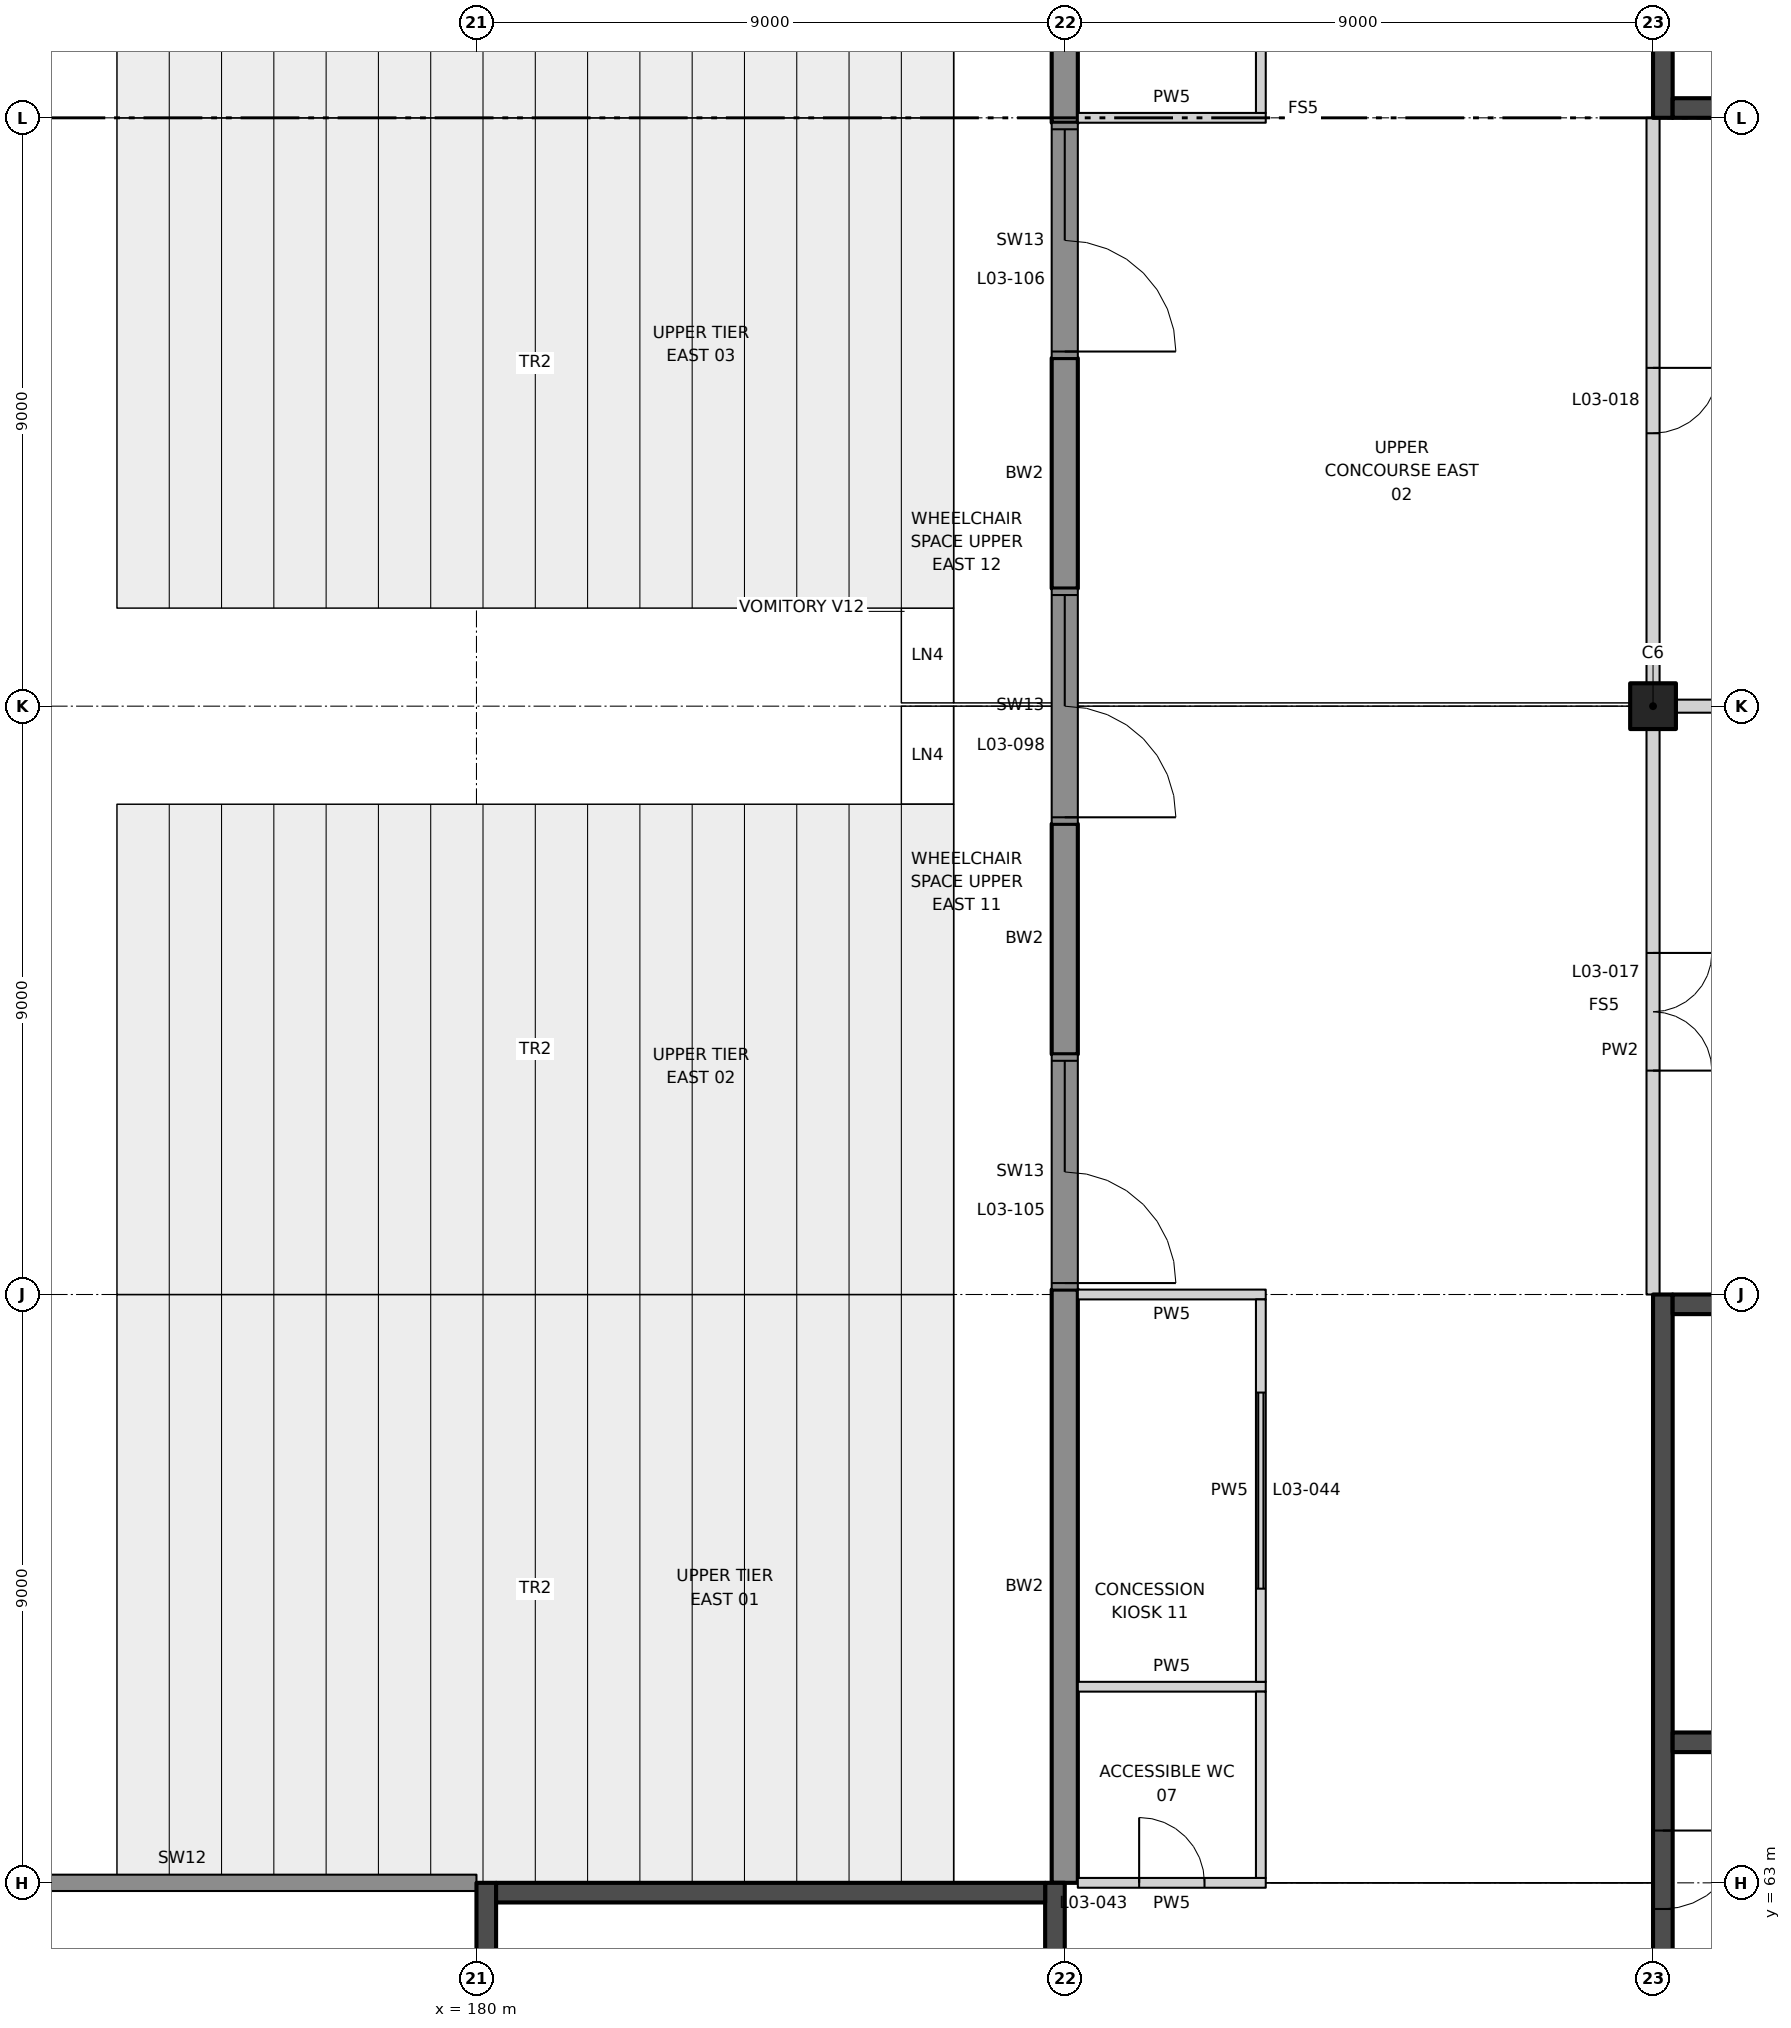
"""IFC4 building model, lengths in metres.
Left out: names, types, materials, properties, quantities, classifications, styles, units other than length and angle.
Written with IfcOpenShell. Run it as: python <this file> out.ifc"""

import sys

from ifc_helpers import new_model, si_unit, direction, frame, frame_2d, origin, origin_2d, place, context, subcontext, project, spatial, rectangle, extrude, element, fill, save


model = new_model("IFC4")
c1 = context("Model", 3, precision=1e-05, world=origin(), true_north=direction((0.0, 1.0)))
c2 = subcontext(c1, "Body", "Model", "MODEL_VIEW")
j1 = project(units=[si_unit("LENGTHUNIT", "METRE"), si_unit("PLANEANGLEUNIT", "RADIAN")], contexts=[c1])
p1 = place(None, origin())
s1 = spatial("IfcSite", under=j1, at=p1, CompositionType="ELEMENT")
p2 = place(p1, origin())
s2 = spatial("IfcBuilding", under=s1, at=p2, CompositionType="ELEMENT")
p3 = place(p2, frame((0.0, 0.0, 22.0)))
s3 = spatial("IfcBuildingStorey", under=s2, at=p3, CompositionType="ELEMENT", Elevation=22.0)
p4 = place(p3, frame((198.0, 81.0, 0.0), z_axis=(0.0, 0.0, 1.0), x_axis=(1.0, 0.0, 0.0)))
e1 = element("IfcColumn", 1, at=p4, inside=s3, PredefinedType="COLUMN", context=c2, shape_type="SweptSolid", body=[
    extrude(rectangle(XDim=0.7, YDim=0.7, at=origin_2d()), origin(), (0.0, 0.0, 1.0), 6.0),
])
p5 = place(p3, frame((189.0, 63.0, 0.0), z_axis=(0.0, 0.0, 1.0), x_axis=(0.0, 1.0, 0.0)))
e2 = element("IfcWall", 2, at=p5, inside=s3, PredefinedType="SOLIDWALL", context=c2, shape_type="SweptSolid", body=[
    extrude(rectangle(XDim=9.075, YDim=0.4, at=frame_2d((4.538, 0.0))), origin(), (0.0, 0.0, 1.0), 6.0),
])
for number, where, z_axis, x_axis in (
    (3, (189.0, 75.675, 0.0), (0.0, 0.0, 1.0), (0.0, 1.0, 0.0)),
    (4, (189.0, 82.8, 0.0), (0.0, 0.0, 1.0), (0.0, 1.0, 0.0)),
):
    element("IfcWall", number, at=place(p3, frame(where, z_axis=z_axis, x_axis=x_axis)), inside=s3, PredefinedType="SOLIDWALL", context=c2, shape_type="SweptSolid", body=[
        extrude(rectangle(XDim=3.525, YDim=0.4, at=frame_2d((1.762, 0.0))), origin(), (0.0, 0.0, 1.0), 6.0),
    ])
p6 = place(p3, frame((189.0, 89.925, 0.0), z_axis=(0.0, 0.0, 1.0), x_axis=(0.0, 1.0, 0.0)))
e5 = element("IfcWall", 5, at=p6, inside=s3, PredefinedType="SOLIDWALL", context=c2, shape_type="SweptSolid", body=[
    extrude(rectangle(XDim=9.075, YDim=0.4, at=frame_2d((4.538, 0.0))), origin(), (0.0, 0.0, 1.0), 6.0),
])
p7 = place(p3, frame((189.2, 63.0, 0.0), z_axis=(0.0, 0.0, 1.0), x_axis=(1.0, 0.0, 0.0)))
e6 = element("IfcWall", 6, at=p7, inside=s3, PredefinedType="PARTITIONING", context=c2, shape_type="SweptSolid", body=[
    extrude(rectangle(XDim=2.875, YDim=0.15, at=frame_2d((1.438, 0.0))), origin(), (0.0, 0.0, 1.0), 4.7),
])
p8 = place(p7, frame((0.938, 0.0, 0.0)))
e7 = element("IfcOpeningElement", 7, at=p8, cuts=e6, PredefinedType="OPENING", context=c2, shape_type="SweptSolid", body=[
    extrude(rectangle(XDim=1.0, YDim=2.1, at=frame_2d((0.5, 1.05))), frame((0.0, 0.085, 0.0), z_axis=(0.0, -1.0, 0.0), x_axis=(1.0, 0.0, 0.0)), (0.0, 0.0, 1.0), 0.17),
])
p9 = place(p3, frame((189.2, 66.0, 0.0), z_axis=(0.0, 0.0, 1.0), x_axis=(1.0, 0.0, 0.0)))
e8 = element("IfcWall", 8, at=p9, inside=s3, PredefinedType="PARTITIONING", context=c2, shape_type="SweptSolid", body=[
    extrude(rectangle(XDim=2.875, YDim=0.15, at=frame_2d((1.438, 0.0))), origin(), (0.0, 0.0, 1.0), 6.0),
])
p10 = place(p3, frame((189.2, 72.0, 0.0), z_axis=(0.0, 0.0, 1.0), x_axis=(1.0, 0.0, 0.0)))
e9 = element("IfcWall", 9, at=p10, inside=s3, PredefinedType="PARTITIONING", context=c2, shape_type="SweptSolid", body=[
    extrude(rectangle(XDim=2.875, YDim=0.15, at=frame_2d((1.438, 0.0))), origin(), (0.0, 0.0, 1.0), 4.7),
])
p11 = place(p3, frame((198.35, 81.0, 0.0), z_axis=(0.0, 0.0, 1.0), x_axis=(1.0, 0.0, 0.0)))
e10 = element("IfcWall", 10, at=p11, inside=s3, PredefinedType="PARTITIONING", context=c2, shape_type="SweptSolid", body=[
    extrude(rectangle(XDim=8.25, YDim=0.2, at=frame_2d((4.125, 0.0))), origin(), (0.0, 0.0, 1.0), 4.8),
])
p12 = place(p3, frame((189.2, 90.0, 0.0), z_axis=(0.0, 0.0, 1.0), x_axis=(1.0, 0.0, 0.0)))
e11 = element("IfcWall", 11, at=p12, inside=s3, PredefinedType="PARTITIONING", context=c2, shape_type="SweptSolid", body=[
    extrude(rectangle(XDim=2.875, YDim=0.15, at=frame_2d((1.438, 0.0))), origin(), (0.0, 0.0, 1.0), 4.7),
])
p13 = place(p3, frame((192.0, 63.075, 0.0), z_axis=(0.0, 0.0, 1.0), x_axis=(0.0, 1.0, 0.0)))
e12 = element("IfcWall", 12, at=p13, inside=s3, PredefinedType="PARTITIONING", context=c2, shape_type="SweptSolid", body=[
    extrude(rectangle(XDim=2.85, YDim=0.15, at=frame_2d((1.425, 0.0))), origin(), (0.0, 0.0, 1.0), 6.0),
])
p14 = place(p3, frame((192.0, 66.075, 0.0), z_axis=(0.0, 0.0, 1.0), x_axis=(0.0, 1.0, 0.0)))
e13 = element("IfcWall", 13, at=p14, inside=s3, PredefinedType="PARTITIONING", context=c2, shape_type="SweptSolid", body=[
    extrude(rectangle(XDim=5.85, YDim=0.15, at=frame_2d((2.925, 0.0))), origin(), (0.0, 0.0, 1.0), 6.0),
])
p15 = place(p14, frame((1.425, 0.0, 0.0)))
e14 = element("IfcOpeningElement", 14, at=p15, cuts=e13, PredefinedType="OPENING", context=c2, shape_type="SweptSolid", body=[
    extrude(rectangle(XDim=3.0, YDim=2.4, at=frame_2d((1.5, 1.2))), frame((0.0, 0.085, 0.0), z_axis=(0.0, -1.0, 0.0), x_axis=(1.0, 0.0, 0.0)), (0.0, 0.0, 1.0), 0.17),
])
p16 = place(p3, frame((192.0, 90.075, 0.0), z_axis=(0.0, 0.0, 1.0), x_axis=(0.0, 1.0, 0.0)))
e15 = element("IfcWall", 15, at=p16, inside=s3, PredefinedType="PARTITIONING", context=c2, shape_type="SweptSolid", body=[
    extrude(rectangle(XDim=5.85, YDim=0.15, at=frame_2d((2.925, 0.0))), origin(), (0.0, 0.0, 1.0), 6.0),
])
p17 = place(p16, frame((1.425, 0.0, 0.0)))
e16 = element("IfcOpeningElement", 16, at=p17, cuts=e15, PredefinedType="OPENING", context=c2, shape_type="SweptSolid", body=[
    extrude(rectangle(XDim=3.0, YDim=2.4, at=frame_2d((1.5, 1.2))), frame((0.0, 0.085, 0.0), z_axis=(0.0, -1.0, 0.0), x_axis=(1.0, 0.0, 0.0)), (0.0, 0.0, 1.0), 0.17),
])
p18 = place(p3, frame((198.0, 72.0, 0.0), z_axis=(0.0, 0.0, 1.0), x_axis=(0.0, 1.0, 0.0)))
e17 = element("IfcWall", 17, at=p18, inside=s3, PredefinedType="PARTITIONING", context=c2, shape_type="SweptSolid", body=[
    extrude(rectangle(XDim=8.65, YDim=0.2, at=frame_2d((4.325, 0.0))), origin(), (0.0, 0.0, 1.0), 4.7),
])
p19 = place(p18, frame((3.425, 0.0, 0.0)))
e18 = element("IfcOpeningElement", 18, at=p19, cuts=e17, PredefinedType="OPENING", context=c2, shape_type="SweptSolid", body=[
    extrude(rectangle(XDim=1.8, YDim=2.1, at=frame_2d((0.9, 1.05))), frame((0.0, 0.11, 0.0), z_axis=(0.0, -1.0, 0.0), x_axis=(1.0, 0.0, 0.0)), (0.0, 0.0, 1.0), 0.22),
])
p20 = place(p3, frame((198.0, 81.35, 0.0), z_axis=(0.0, 0.0, 1.0), x_axis=(0.0, 1.0, 0.0)))
e19 = element("IfcWall", 19, at=p20, inside=s3, PredefinedType="PARTITIONING", context=c2, shape_type="SweptSolid", body=[
    extrude(rectangle(XDim=8.65, YDim=0.2, at=frame_2d((4.325, 0.0))), origin(), (0.0, 0.0, 1.0), 4.7),
])
p21 = place(p20, frame((3.825, 0.0, 0.0)))
e20 = element("IfcOpeningElement", 20, at=p21, cuts=e19, PredefinedType="OPENING", context=c2, shape_type="SweptSolid", body=[
    extrude(rectangle(XDim=1.0, YDim=2.1, at=frame_2d((0.5, 1.05))), frame((0.0, 0.11, 0.0), z_axis=(0.0, -1.0, 0.0), x_axis=(1.0, 0.0, 0.0)), (0.0, 0.0, 1.0), 0.22),
])
p22 = place(p3, frame((198.15, 54.0, 0.0), z_axis=(0.0, 0.0, 1.0), x_axis=(0.0, 1.0, 0.0)))
e21 = element("IfcWall", 21, at=p22, inside=s3, PredefinedType="SHEAR", context=c2, shape_type="SweptSolid", body=[
    extrude(rectangle(XDim=18.0, YDim=0.3, at=frame_2d((9.0, 0.0))), origin(), (0.0, 0.0, 1.0), 6.0),
])
p23 = place(p22, frame((8.6, 0.0, 0.0)))
e22 = element("IfcOpeningElement", 22, at=p23, cuts=e21, PredefinedType="OPENING", context=c2, shape_type="SweptSolid", body=[
    extrude(rectangle(XDim=1.2, YDim=2.1, at=frame_2d((0.6, 1.05))), frame((0.0, 0.16, 0.0), z_axis=(0.0, -1.0, 0.0), x_axis=(1.0, 0.0, 0.0)), (0.0, 0.0, 1.0), 0.32),
])
for number, where, z_axis, x_axis in (
    (23, (198.3, 71.85, 0.0), (0.0, 0.0, 1.0), (1.0, 0.0, 0.0)),
    (24, (198.3, 65.15, 0.0), (0.0, 0.0, 1.0), (1.0, 0.0, 0.0)),
):
    element("IfcWall", number, at=place(p3, frame(where, z_axis=z_axis, x_axis=x_axis)), inside=s3, PredefinedType="SHEAR", context=c2, shape_type="SweptSolid", body=[
        extrude(rectangle(XDim=8.4, YDim=0.3, at=frame_2d((4.2, 0.0))), origin(), (0.0, 0.0, 1.0), 6.0),
    ])
p24 = place(p3, frame((198.15, 108.0, 0.0), z_axis=(0.0, 0.0, 1.0), x_axis=(0.0, -1.0, 0.0)))
e25 = element("IfcWall", 25, at=p24, inside=s3, PredefinedType="SHEAR", context=c2, shape_type="SweptSolid", body=[
    extrude(rectangle(XDim=18.0, YDim=0.3, at=frame_2d((9.0, 0.0))), origin(), (0.0, 0.0, 1.0), 6.0),
])
p25 = place(p24, frame((8.6, 0.0, 0.0)))
e26 = element("IfcOpeningElement", 26, at=p25, cuts=e25, PredefinedType="OPENING", context=c2, shape_type="SweptSolid", body=[
    extrude(rectangle(XDim=1.2, YDim=2.1, at=frame_2d((0.6, 1.05))), frame((0.0, 0.16, 0.0), z_axis=(0.0, -1.0, 0.0), x_axis=(1.0, 0.0, 0.0)), (0.0, 0.0, 1.0), 0.32),
])
p26 = place(p3, frame((198.3, 90.15, 0.0), z_axis=(0.0, 0.0, 1.0), x_axis=(1.0, 0.0, 0.0)))
e27 = element("IfcWall", 27, at=p26, inside=s3, PredefinedType="SHEAR", context=c2, shape_type="SweptSolid", body=[
    extrude(rectangle(XDim=8.4, YDim=0.3, at=frame_2d((4.2, 0.0))), origin(), (0.0, 0.0, 1.0), 6.0),
])
p27 = place(p3, frame((180.15, 63.0, 0.0), z_axis=(0.0, 0.0, 1.0), x_axis=(0.0, -1.0, 0.0)))
e28 = element("IfcWall", 28, at=p27, inside=s3, PredefinedType="SHEAR", context=c2, shape_type="SweptSolid", body=[
    extrude(rectangle(XDim=18.0, YDim=0.3, at=frame_2d((9.0, 0.0))), origin(), (0.0, 0.0, 1.0), 6.0),
])
p28 = place(p27, frame((8.6, 0.0, 0.0)))
e29 = element("IfcOpeningElement", 29, at=p28, cuts=e28, PredefinedType="OPENING", context=c2, shape_type="SweptSolid", body=[
    extrude(rectangle(XDim=1.2, YDim=2.1, at=frame_2d((0.6, 1.05))), frame((0.0, 0.16, 0.0), z_axis=(0.0, -1.0, 0.0), x_axis=(1.0, 0.0, 0.0)), (0.0, 0.0, 1.0), 0.32),
])
p29 = place(p3, frame((188.85, 63.0, 0.0), z_axis=(0.0, 0.0, 1.0), x_axis=(0.0, -1.0, 0.0)))
e30 = element("IfcWall", 30, at=p29, inside=s3, PredefinedType="SHEAR", context=c2, shape_type="SweptSolid", body=[
    extrude(rectangle(XDim=18.0, YDim=0.3, at=frame_2d((9.0, 0.0))), origin(), (0.0, 0.0, 1.0), 6.0),
])
p30 = place(p3, frame((180.3, 62.85, 0.0), z_axis=(0.0, 0.0, 1.0), x_axis=(1.0, 0.0, 0.0)))
e31 = element("IfcWall", 31, at=p30, inside=s3, PredefinedType="SHEAR", context=c2, shape_type="SweptSolid", body=[
    extrude(rectangle(XDim=8.4, YDim=0.3, at=frame_2d((4.2, 0.0))), origin(), (0.0, 0.0, 1.0), 6.0),
])
p31 = place(p3, frame((171.0, 63.0, 0.0), z_axis=(0.0, 0.0, 1.0), x_axis=(1.0, 0.0, 0.0)))
e32 = element("IfcWall", 32, at=p31, inside=s3, PredefinedType="SOLIDWALL", context=c2, shape_type="SweptSolid", body=[
    extrude(rectangle(XDim=9.0, YDim=0.25, at=frame_2d((4.5, 0.0))), origin(), (0.0, 0.0, 1.0), 4.7),
])
p32 = place(p3, frame((189.0, 79.2, 0.0), z_axis=(0.0, 0.0, 1.0), x_axis=(0.0, 1.0, 0.0)))
e33 = element("IfcWall", 33, at=p32, inside=s3, PredefinedType="SOLIDWALL", context=c2, shape_type="SweptSolid", body=[
    extrude(rectangle(XDim=3.6, YDim=0.4, at=frame_2d((1.8, 0.0))), origin(), (0.0, 0.0, 1.0), 3.0),
])
p33 = place(p32, frame((0.1, 0.0, 0.0)))
e34 = element("IfcOpeningElement", 34, at=p33, cuts=e33, PredefinedType="OPENING", context=c2, shape_type="SweptSolid", body=[
    extrude(rectangle(XDim=3.4, YDim=2.4, at=frame_2d((1.7, 1.2))), frame((0.0, 0.21, 0.0), z_axis=(0.0, -1.0, 0.0), x_axis=(1.0, 0.0, 0.0)), (0.0, 0.0, 1.0), 0.42),
])
p34 = place(p3, frame((189.0, 72.075, 0.0), z_axis=(0.0, 0.0, 1.0), x_axis=(0.0, 1.0, 0.0)))
e35 = element("IfcWall", 35, at=p34, inside=s3, PredefinedType="SOLIDWALL", context=c2, shape_type="SweptSolid", body=[
    extrude(rectangle(XDim=3.6, YDim=0.4, at=frame_2d((1.8, 0.0))), origin(), (0.0, 0.0, 1.0), 3.0),
])
p35 = place(p34, frame((0.1, 0.0, 0.0)))
e36 = element("IfcOpeningElement", 36, at=p35, cuts=e35, PredefinedType="OPENING", context=c2, shape_type="SweptSolid", body=[
    extrude(rectangle(XDim=3.4, YDim=2.4, at=frame_2d((1.7, 1.2))), frame((0.0, 0.21, 0.0), z_axis=(0.0, -1.0, 0.0), x_axis=(1.0, 0.0, 0.0)), (0.0, 0.0, 1.0), 0.42),
])
p36 = place(p3, frame((189.0, 86.325, 0.0), z_axis=(0.0, 0.0, 1.0), x_axis=(0.0, 1.0, 0.0)))
e37 = element("IfcWall", 37, at=p36, inside=s3, PredefinedType="SOLIDWALL", context=c2, shape_type="SweptSolid", body=[
    extrude(rectangle(XDim=3.6, YDim=0.4, at=frame_2d((1.8, 0.0))), origin(), (0.0, 0.0, 1.0), 3.0),
])
p37 = place(p36, frame((0.1, 0.0, 0.0)))
e38 = element("IfcOpeningElement", 38, at=p37, cuts=e37, PredefinedType="OPENING", context=c2, shape_type="SweptSolid", body=[
    extrude(rectangle(XDim=3.4, YDim=2.4, at=frame_2d((1.7, 1.2))), frame((0.0, 0.21, 0.0), z_axis=(0.0, -1.0, 0.0), x_axis=(1.0, 0.0, 0.0)), (0.0, 0.0, 1.0), 0.42),
])
p38 = place(p19, frame((1.8, 0.0, 0.0), z_axis=(0.0, 0.0, 1.0), x_axis=(-1.0, 0.0, 0.0)))
e39 = element("IfcDoor", 39, at=p38, inside=s3, OperationType="DOUBLE_DOOR_DOUBLE_SWING", PredefinedType="DOOR", context=c2, shape_type="SweptSolid", body=[
    extrude(rectangle(XDim=1.8, YDim=2.1, at=frame_2d((0.9, 1.05))), frame((0.0, 0.025, 0.0), z_axis=(0.0, -1.0, 0.0), x_axis=(1.0, 0.0, 0.0)), (0.0, 0.0, 1.0), 0.05),
])
fill(e18, e39)
p39 = place(p21, frame((1.0, 0.0, 0.0), z_axis=(0.0, 0.0, 1.0), x_axis=(-1.0, 0.0, 0.0)))
e40 = element("IfcDoor", 40, at=p39, inside=s3, OperationType="SINGLE_SWING_LEFT", PredefinedType="DOOR", context=c2, shape_type="SweptSolid", body=[
    extrude(rectangle(XDim=1.0, YDim=2.1, at=frame_2d((0.5, 1.05))), frame((0.0, 0.025, 0.0), z_axis=(0.0, -1.0, 0.0), x_axis=(1.0, 0.0, 0.0)), (0.0, 0.0, 1.0), 0.05),
])
fill(e20, e40)
p40 = place(p8, origin())
e41 = element("IfcDoor", 41, at=p40, inside=s3, OperationType="SINGLE_SWING_LEFT", PredefinedType="DOOR", context=c2, shape_type="SweptSolid", body=[
    extrude(rectangle(XDim=1.0, YDim=2.1, at=frame_2d((0.5, 1.05))), frame((0.0, 0.025, 0.0), z_axis=(0.0, -1.0, 0.0), x_axis=(1.0, 0.0, 0.0)), (0.0, 0.0, 1.0), 0.05),
])
fill(e7, e41)
p41 = place(p15, origin())
e42 = element("IfcDoor", 42, at=p41, inside=s3, OperationType="ROLLINGUP", PredefinedType="DOOR", context=c2, shape_type="SweptSolid", body=[
    extrude(rectangle(XDim=3.0, YDim=2.4, at=frame_2d((1.5, 1.2))), frame((0.0, 0.025, 0.0), z_axis=(0.0, -1.0, 0.0), x_axis=(1.0, 0.0, 0.0)), (0.0, 0.0, 1.0), 0.05),
])
fill(e14, e42)
p42 = place(p23, frame((1.2, 0.0, 0.0), z_axis=(0.0, 0.0, 1.0), x_axis=(-1.0, 0.0, 0.0)))
e43 = element("IfcDoor", 43, at=p42, inside=s3, OperationType="SINGLE_SWING_LEFT", PredefinedType="DOOR", context=c2, shape_type="SweptSolid", body=[
    extrude(rectangle(XDim=1.2, YDim=2.1, at=frame_2d((0.6, 1.05))), frame((0.0, 0.025, 0.0), z_axis=(0.0, -1.0, 0.0), x_axis=(1.0, 0.0, 0.0)), (0.0, 0.0, 1.0), 0.05),
])
fill(e22, e43)
p43 = place(p33, frame((3.4, 0.0, 0.0), z_axis=(0.0, 0.0, 1.0), x_axis=(-1.0, 0.0, 0.0)))
e44 = element("IfcDoor", 44, at=p43, inside=s3, OperationType="DOUBLE_DOOR_SINGLE_SWING", PredefinedType="DOOR", context=c2, shape_type="SweptSolid", body=[
    extrude(rectangle(XDim=3.4, YDim=2.4, at=frame_2d((1.7, 1.2))), frame((0.0, 0.025, 0.0), z_axis=(0.0, -1.0, 0.0), x_axis=(1.0, 0.0, 0.0)), (0.0, 0.0, 1.0), 0.05),
])
fill(e34, e44)
p44 = place(p35, frame((3.4, 0.0, 0.0), z_axis=(0.0, 0.0, 1.0), x_axis=(-1.0, 0.0, 0.0)))
e45 = element("IfcDoor", 45, at=p44, inside=s3, OperationType="DOUBLE_DOOR_SINGLE_SWING", PredefinedType="DOOR", context=c2, shape_type="SweptSolid", body=[
    extrude(rectangle(XDim=3.4, YDim=2.4, at=frame_2d((1.7, 1.2))), frame((0.0, 0.025, 0.0), z_axis=(0.0, -1.0, 0.0), x_axis=(1.0, 0.0, 0.0)), (0.0, 0.0, 1.0), 0.05),
])
fill(e36, e45)
p45 = place(p37, frame((3.4, 0.0, 0.0), z_axis=(0.0, 0.0, 1.0), x_axis=(-1.0, 0.0, 0.0)))
e46 = element("IfcDoor", 46, at=p45, inside=s3, OperationType="DOUBLE_DOOR_SINGLE_SWING", PredefinedType="DOOR", context=c2, shape_type="SweptSolid", body=[
    extrude(rectangle(XDim=3.4, YDim=2.4, at=frame_2d((1.7, 1.2))), frame((0.0, 0.025, 0.0), z_axis=(0.0, -1.0, 0.0), x_axis=(1.0, 0.0, 0.0)), (0.0, 0.0, 1.0), 0.05),
])
fill(e38, e46)
save(model, sys.argv[1])
